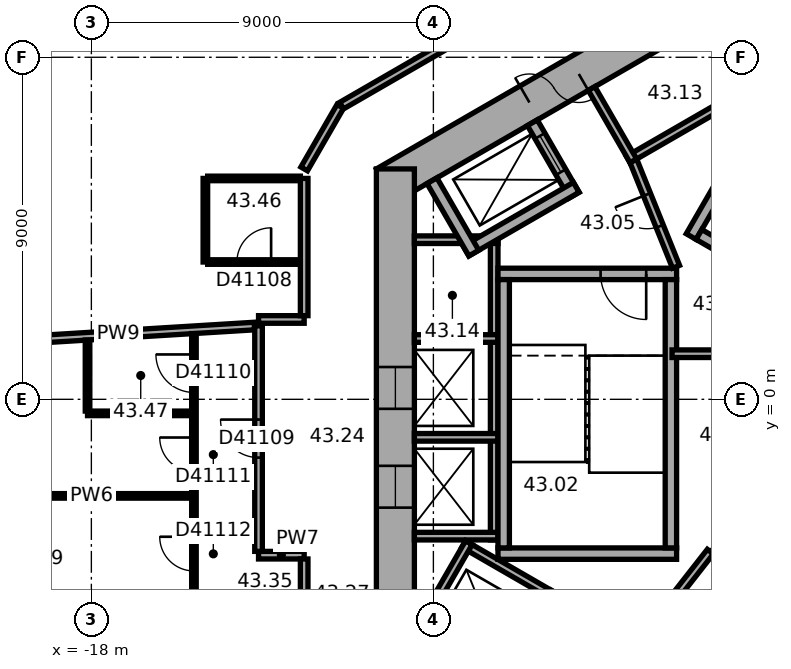
"""IFC4 building model, lengths in metres.
Left out: names, types, materials, properties, quantities, classifications, styles, units other than length and angle.
Written with IfcOpenShell. Run it as: python <this file> out.ifc"""

import sys

from ifc_helpers import new_model, si_unit, direction, frame, frame_2d, origin, place, context, subcontext, project, spatial, rectangle, extrude, element, fill, save


model = new_model("IFC4")
c1 = context("Model", 3, precision=1e-05, world=origin(), true_north=direction((0.0, 1.0)))
c2 = subcontext(c1, "Body", "Model", "MODEL_VIEW")
j1 = project(units=[si_unit("LENGTHUNIT", "METRE"), si_unit("PLANEANGLEUNIT", "RADIAN")], contexts=[c1])
p1 = place(None, origin())
s1 = spatial("IfcSite", under=j1, at=p1, CompositionType="ELEMENT")
p2 = place(p1, origin())
s2 = spatial("IfcBuilding", under=s1, at=p2, CompositionType="ELEMENT")
p3 = place(p2, frame((0.0, 0.0, 176.2)))
s3 = spatial("IfcBuildingStorey", under=s2, at=p3, CompositionType="ELEMENT", Elevation=176.2)
p4 = place(p3, frame((0.25, 11.691, 0.0), z_axis=(0.0, 0.0, 1.0), x_axis=(-0.866022616891, -0.50000482701, 0.0)))
e1 = element("IfcWall", 1, at=p4, inside=s3, PredefinedType="SHEAR", context=c2, shape_type="SweptSolid", body=[
    extrude(rectangle(XDim=12.125, YDim=1.0, at=frame_2d((6.062, 0.0))), origin(), (0.0, 0.0, 1.0), 3.7),
])
p5 = place(p4, frame((6.262, 0.0, 0.0)))
e2 = element("IfcOpeningElement", 2, at=p5, cuts=e1, PredefinedType="OPENING", context=c2, shape_type="SweptSolid", body=[
    extrude(rectangle(XDim=1.5, YDim=2.1, at=frame_2d((0.75, 1.05))), frame((0.0, 0.51, 0.0), z_axis=(0.0, -1.0, 0.0), x_axis=(1.0, 0.0, 0.0)), (0.0, 0.0, 1.0), 1.02),
])
p6 = place(p4, frame((3.112, 0.0, 0.0)))
e3 = element("IfcOpeningElement", 3, at=p6, cuts=e1, PredefinedType="OPENING", context=c2, shape_type="SweptSolid", body=[
    extrude(rectangle(XDim=0.9, YDim=2.1, at=frame_2d((0.45, 1.05))), frame((0.0, 0.51, 0.0), z_axis=(0.0, -1.0, 0.0), x_axis=(1.0, 0.0, 0.0)), (0.0, 0.0, 1.0), 1.02),
])
p7 = place(p3, frame((-10.0, 6.062, 0.0), z_axis=(0.0, 0.0, 1.0), x_axis=(0.0, -1.0, 0.0)))
e4 = element("IfcWall", 4, at=p7, inside=s3, PredefinedType="SHEAR", context=c2, shape_type="SweptSolid", body=[
    extrude(rectangle(XDim=12.125, YDim=1.0, at=frame_2d((6.062, 0.0))), origin(), (0.0, 0.0, 1.0), 3.7),
])
p8 = place(p7, frame((5.212, 0.0, 0.0)))
e5 = element("IfcOpeningElement", 5, at=p8, cuts=e4, PredefinedType="OPENING", context=c2, shape_type="SweptSolid", body=[
    extrude(rectangle(XDim=1.1, YDim=2.1, at=frame_2d((0.55, 1.05))), frame((0.0, 0.51, 0.0), z_axis=(0.0, -1.0, 0.0), x_axis=(1.0, 0.0, 0.0)), (0.0, 0.0, 1.0), 1.02),
])
p9 = place(p7, frame((7.812, 0.0, 0.0)))
e6 = element("IfcOpeningElement", 6, at=p9, cuts=e4, PredefinedType="OPENING", context=c2, shape_type="SweptSolid", body=[
    extrude(rectangle(XDim=1.1, YDim=2.1, at=frame_2d((0.55, 1.05))), frame((0.0, 0.51, 0.0), z_axis=(0.0, -1.0, 0.0), x_axis=(1.0, 0.0, 0.0)), (0.0, 0.0, 1.0), 1.02),
])
p10 = place(p3, frame((0.803, 9.009, 0.0), z_axis=(0.0, 0.0, 1.0), x_axis=(-0.866028230842, -0.499995103361, 0.0)))
e7 = element("IfcWall", 7, at=p10, inside=s3, PredefinedType="PARTITIONING", context=c2, shape_type="SweptSolid", body=[
    extrude(rectangle(XDim=5.4, YDim=0.2, at=frame_2d((2.7, 0.0))), origin(), (0.0, 0.0, 1.0), 3.42),
])
p11 = place(p3, frame((-3.737, 6.272, 0.0), z_axis=(0.0, 0.0, 1.0), x_axis=(-0.50002983664, 0.866008176907, 0.0)))
e8 = element("IfcWall", 8, at=p11, inside=s3, PredefinedType="PARTITIONING", context=c2, shape_type="SweptSolid", body=[
    extrude(rectangle(XDim=2.2, YDim=0.2, at=frame_2d((1.1, 0.0))), origin(), (0.0, 0.0, 1.0), 3.42),
])
p12 = place(p3, frame((-7.4, 4.3, 0.0), z_axis=(0.0, 0.0, 1.0), x_axis=(0.0, -1.0, 0.0)))
e9 = element("IfcWall", 9, at=p12, inside=s3, PredefinedType="PARTITIONING", context=c2, shape_type="SweptSolid", body=[
    extrude(rectangle(XDim=8.0, YDim=0.2, at=frame_2d((4.0, 0.0))), origin(), (0.0, 0.0, 1.0), 3.42),
])
for number, where, z_axis, x_axis in (
    (10, (-7.3, 4.2, 0.0), (0.0, 0.0, 1.0), (-1.0, 0.0, 0.0)),
    (11, (-7.3, 1.6, 0.0), (0.0, 0.0, 1.0), (-1.0, 0.0, 0.0)),
    (12, (-7.3, -1.0, 0.0), (0.0, 0.0, 1.0), (-1.0, 0.0, 0.0)),
    (13, (-7.3, -3.6, 0.0), (0.0, 0.0, 1.0), (-1.0, 0.0, 0.0)),
):
    element("IfcWall", number, at=place(p3, frame(where, z_axis=z_axis, x_axis=x_axis)), inside=s3, PredefinedType="PARTITIONING", context=c2, shape_type="SweptSolid", body=[
        extrude(rectangle(XDim=2.2, YDim=0.2, at=frame_2d((1.1, 0.0))), origin(), (0.0, 0.0, 1.0), 3.42),
    ])
p13 = place(p3, frame((-8.203, -3.809, 0.0), z_axis=(0.0, 0.0, 1.0), x_axis=(0.866028230842, -0.499995103361, 0.0)))
e14 = element("IfcWall", 14, at=p13, inside=s3, PredefinedType="PARTITIONING", context=c2, shape_type="SweptSolid", body=[
    extrude(rectangle(XDim=5.4, YDim=0.2, at=frame_2d((2.7, 0.0))), origin(), (0.0, 0.0, 1.0), 3.42),
])
p14 = place(p3, frame((-8.067, -3.772, 0.0), z_axis=(0.0, 0.0, 1.0), x_axis=(-0.50002983664, -0.866008176907, 0.0)))
e15 = element("IfcWall", 15, at=p14, inside=s3, PredefinedType="PARTITIONING", context=c2, shape_type="SweptSolid", body=[
    extrude(rectangle(XDim=2.2, YDim=0.2, at=frame_2d((1.1, 0.0))), origin(), (0.0, 0.0, 1.0), 3.42),
])
p15 = place(p3, frame((-2.216, 4.282, 0.0), z_axis=(0.0, 0.0, 1.0), x_axis=(0.499977259774, 0.866038532462, 0.0)))
e16 = element("IfcWall", 16, at=p15, inside=s3, PredefinedType="SHEAR", context=c2, shape_type="SweptSolid", body=[
    extrude(rectangle(XDim=4.7, YDim=0.3, at=frame_2d((2.35, 0.0))), origin(), (0.0, 0.0, 1.0), 3.42),
])
p16 = place(p3, frame((4.103, 0.807, 0.0), z_axis=(0.0, 0.0, 1.0), x_axis=(-0.866027801685, 0.499995846692, 0.0)))
e17 = element("IfcWall", 17, at=p16, inside=s3, PredefinedType="SHEAR", context=c2, shape_type="SweptSolid", body=[
    extrude(rectangle(XDim=7.06, YDim=0.3, at=frame_2d((3.53, 0.0))), origin(), (0.0, 0.0, 1.0), 3.42),
])
p17 = place(p3, frame((-2.6, 3.3, 0.0), z_axis=(0.0, 0.0, 1.0), x_axis=(-1.0, 0.0, 0.0)))
e18 = element("IfcWall", 18, at=p17, inside=s3, PredefinedType="SHEAR", context=c2, shape_type="SweptSolid", body=[
    extrude(rectangle(XDim=4.7, YDim=0.3, at=frame_2d((2.35, 0.0))), origin(), (0.0, 0.0, 1.0), 3.42),
])
p18 = place(p17, frame((0.8, 0.0, 0.0)))
e19 = element("IfcOpeningElement", 19, at=p18, cuts=e18, PredefinedType="OPENING", context=c2, shape_type="SweptSolid", body=[
    extrude(rectangle(XDim=1.2, YDim=2.1, at=frame_2d((0.6, 1.05))), frame((0.0, 0.16, 0.0), z_axis=(0.0, -1.0, 0.0), x_axis=(1.0, 0.0, 0.0)), (0.0, 0.0, 1.0), 0.32),
])
p19 = place(p3, frame((-2.6, -4.06, 0.0), z_axis=(0.0, 0.0, 1.0), x_axis=(-1.0, 0.0, 0.0)))
e20 = element("IfcWall", 20, at=p19, inside=s3, PredefinedType="SHEAR", context=c2, shape_type="SweptSolid", body=[
    extrude(rectangle(XDim=4.7, YDim=0.3, at=frame_2d((2.35, 0.0))), origin(), (0.0, 0.0, 1.0), 3.42),
])
for number, where, z_axis, x_axis in (
    (21, (-2.75, 3.15, 0.0), (0.0, 0.0, 1.0), (0.0, -1.0, 0.0)),
    (22, (-7.15, 3.15, 0.0), (0.0, 0.0, 1.0), (0.0, -1.0, 0.0)),
):
    element("IfcWall", number, at=place(p3, frame(where, z_axis=z_axis, x_axis=x_axis)), inside=s3, PredefinedType="SHEAR", context=c2, shape_type="SweptSolid", body=[
        extrude(rectangle(XDim=7.06, YDim=0.3, at=frame_2d((3.53, 0.0))), origin(), (0.0, 0.0, 1.0), 3.42),
    ])
p20 = place(p3, frame((-5.295, 5.372, 0.0), z_axis=(0.0, 0.0, 1.0), x_axis=(-0.500077893725, 0.86598042715, 0.0)))
e23 = element("IfcWall", 23, at=p20, inside=s3, PredefinedType="SHEAR", context=c2, shape_type="SweptSolid", body=[
    extrude(rectangle(XDim=2.2, YDim=0.3, at=frame_2d((1.1, 0.0))), origin(), (0.0, 0.0, 1.0), 3.42),
])
p21 = place(p20, frame((0.7, 0.0, 0.0)))
e24 = element("IfcOpeningElement", 24, at=p21, cuts=e23, PredefinedType="OPENING", context=c2, shape_type="SweptSolid", body=[
    extrude(rectangle(XDim=1.1, YDim=2.1, at=frame_2d((0.55, 1.05))), frame((0.0, 0.16, 0.0), z_axis=(0.0, -1.0, 0.0), x_axis=(1.0, 0.0, 0.0)), (0.0, 0.0, 1.0), 0.32),
])
p22 = place(p3, frame((-5.24, 5.577, 0.0), z_axis=(0.0, 0.0, 1.0), x_axis=(-0.866014461049, -0.500018952895, 0.0)))
e25 = element("IfcWall", 25, at=p22, inside=s3, PredefinedType="SHEAR", context=c2, shape_type="SweptSolid", body=[
    extrude(rectangle(XDim=3.35, YDim=0.3, at=frame_2d((1.675, 0.0))), origin(), (0.0, 0.0, 1.0), 3.42),
])
p23 = place(p3, frame((-7.937, 3.847, 0.0), z_axis=(0.0, 0.0, 1.0), x_axis=(-0.50002983664, 0.866008176907, 0.0)))
e26 = element("IfcWall", 26, at=p23, inside=s3, PredefinedType="SHEAR", context=c2, shape_type="SweptSolid", body=[
    extrude(rectangle(XDim=2.2, YDim=0.3, at=frame_2d((1.1, 0.0))), origin(), (0.0, 0.0, 1.0), 3.42),
])
p24 = place(p3, frame((-2.615, 3.487, 0.0), z_axis=(0.0, 0.0, 1.0), x_axis=(-0.373576831041, 0.92759924068, 0.0)))
e27 = element("IfcWall", 27, at=p24, inside=s3, PredefinedType="PARTITIONING", context=c2, shape_type="SweptSolid", body=[
    extrude(rectangle(XDim=3.002, YDim=0.2, at=frame_2d((1.501, 0.0))), origin(), (0.0, 0.0, 1.0), 3.42),
])
p25 = place(p24, frame((1.15, 0.0, 0.0)))
e28 = element("IfcOpeningElement", 28, at=p25, cuts=e27, PredefinedType="OPENING", context=c2, shape_type="SweptSolid", body=[
    extrude(rectangle(XDim=0.9, YDim=2.1, at=frame_2d((0.45, 1.05))), frame((0.0, 0.11, 0.0), z_axis=(0.0, -1.0, 0.0), x_axis=(1.0, 0.0, 0.0)), (0.0, 0.0, 1.0), 0.22),
])
p26 = place(p3, frame((-1.712, -4.008, 0.0), z_axis=(0.0, 0.0, 1.0), x_axis=(-0.616549420702, -0.787316208287, 0.0)))
e29 = element("IfcWall", 29, at=p26, inside=s3, PredefinedType="PARTITIONING", context=c2, shape_type="SweptSolid", body=[
    extrude(rectangle(XDim=3.002, YDim=0.2, at=frame_2d((1.501, 0.0))), origin(), (0.0, 0.0, 1.0), 3.42),
])
p27 = place(p3, frame((-2.72, 1.2, 0.0), z_axis=(0.0, 0.0, 1.0), x_axis=(1.0, 0.0, 0.0)))
e30 = element("IfcWall", 30, at=p27, inside=s3, PredefinedType="PARTITIONING", context=c2, shape_type="SweptSolid", body=[
    extrude(rectangle(XDim=5.961, YDim=0.2, at=frame_2d((2.981, 0.0))), origin(), (0.0, 0.0, 1.0), 3.42),
])
p28 = place(p3, frame((-20.88, 1.49, 0.0), z_axis=(0.0, 0.0, 1.0), x_axis=(0.998134881975, 0.061047173439, 0.0)))
e31 = element("IfcWall", 31, at=p28, inside=s3, PredefinedType="PARTITIONING", context=c2, shape_type="SweptSolid", body=[
    extrude(rectangle(XDim=7.183, YDim=0.2, at=frame_2d((3.591, 0.0))), origin(), (0.0, 0.0, 1.0), 2.87),
])
p29 = place(p3, frame((-20.633, -2.541, 0.0), z_axis=(0.0, 0.0, 1.0), x_axis=(1.0, 0.0, 0.0)))
e32 = element("IfcWall", 32, at=p29, inside=s3, PredefinedType="PARTITIONING", context=c2, shape_type="SweptSolid", body=[
    extrude(rectangle(XDim=5.272, YDim=0.12, at=frame_2d((2.636, 0.0))), origin(), (0.0, 0.0, 1.0), 3.42),
])
p30 = place(p3, frame((-18.101, -0.369, 0.0), z_axis=(0.0, 0.0, 1.0), x_axis=(1.0, 0.0, 0.0)))
e33 = element("IfcWall", 33, at=p30, inside=s3, PredefinedType="PARTITIONING", context=c2, shape_type="SweptSolid", body=[
    extrude(rectangle(XDim=2.74, YDim=0.12, at=frame_2d((1.37, 0.0))), origin(), (0.0, 0.0, 1.0), 3.42),
])
p31 = place(p3, frame((-18.101, 1.559, 0.0), z_axis=(0.0, 0.0, 1.0), x_axis=(0.0, -1.0, 0.0)))
e34 = element("IfcWall", 34, at=p31, inside=s3, PredefinedType="PARTITIONING", context=c2, shape_type="SweptSolid", body=[
    extrude(rectangle(XDim=1.869, YDim=0.12, at=frame_2d((0.934, 0.0))), origin(), (0.0, 0.0, 1.0), 3.42),
])
p32 = place(p3, frame((-15.301, 1.731, 0.0), z_axis=(0.0, 0.0, 1.0), x_axis=(0.0, -1.0, 0.0)))
e35 = element("IfcWall", 35, at=p32, inside=s3, PredefinedType="PARTITIONING", context=c2, shape_type="SweptSolid", body=[
    extrude(rectangle(XDim=7.322, YDim=0.12, at=frame_2d((3.661, 0.0))), origin(), (0.0, 0.0, 1.0), 3.42),
])
p33 = place(p32, frame((0.55, 0.0, 0.0)))
e36 = element("IfcOpeningElement", 36, at=p33, cuts=e35, PredefinedType="OPENING", context=c2, shape_type="SweptSolid", body=[
    extrude(rectangle(XDim=1.0, YDim=2.1, at=frame_2d((0.5, 1.05))), frame((0.0, 0.07, 0.0), z_axis=(0.0, -1.0, 0.0), x_axis=(1.0, 0.0, 0.0)), (0.0, 0.0, 1.0), 0.14),
])
p34 = place(p32, frame((2.736, 0.0, 0.0)))
e37 = element("IfcOpeningElement", 37, at=p34, cuts=e35, PredefinedType="OPENING", context=c2, shape_type="SweptSolid", body=[
    extrude(rectangle(XDim=0.9, YDim=2.1, at=frame_2d((0.45, 1.05))), frame((0.0, 0.07, 0.0), z_axis=(0.0, -1.0, 0.0), x_axis=(1.0, 0.0, 0.0)), (0.0, 0.0, 1.0), 0.14),
])
p35 = place(p32, frame((5.347, 0.0, 0.0)))
e38 = element("IfcOpeningElement", 38, at=p35, cuts=e35, PredefinedType="OPENING", context=c2, shape_type="SweptSolid", body=[
    extrude(rectangle(XDim=0.9, YDim=2.1, at=frame_2d((0.45, 1.05))), frame((0.0, 0.07, 0.0), z_axis=(0.0, -1.0, 0.0), x_axis=(1.0, 0.0, 0.0)), (0.0, 0.0, 1.0), 0.14),
])
p36 = place(p3, frame((-15.0, 3.612, 0.0), z_axis=(0.0, 0.0, 1.0), x_axis=(0.0, 1.0, 0.0)))
e39 = element("IfcWall", 39, at=p36, inside=s3, PredefinedType="PARTITIONING", context=c2, shape_type="SweptSolid", body=[
    extrude(rectangle(XDim=2.2, YDim=0.12, at=frame_2d((1.1, 0.0))), origin(), (0.0, 0.0, 1.0), 3.42),
])
p37 = place(p3, frame((-14.94, 5.812, 0.0), z_axis=(0.0, 0.0, 1.0), x_axis=(1.0, 0.0, 0.0)))
e40 = element("IfcWall", 40, at=p37, inside=s3, PredefinedType="PARTITIONING", context=c2, shape_type="SweptSolid", body=[
    extrude(rectangle(XDim=2.44, YDim=0.12, at=frame_2d((1.22, 0.0))), origin(), (0.0, 0.0, 1.0), 3.42),
])
p38 = place(p3, frame((-13.601, -4.101, 0.0), z_axis=(0.0, 0.0, 1.0), x_axis=(1.0, 0.0, 0.0)))
e41 = element("IfcWall", 41, at=p38, inside=s3, PredefinedType="PARTITIONING", context=c2, shape_type="SweptSolid", body=[
    extrude(rectangle(XDim=1.201, YDim=0.2, at=frame_2d((0.601, 0.0))), origin(), (0.0, 0.0, 1.0), 3.42),
])
p39 = place(p3, frame((-13.601, 1.935, 0.0), z_axis=(0.0, 0.0, 1.0), x_axis=(0.0, -1.0, 0.0)))
e42 = element("IfcWall", 42, at=p39, inside=s3, PredefinedType="PARTITIONING", context=c2, shape_type="SweptSolid", body=[
    extrude(rectangle(XDim=5.936, YDim=0.2, at=frame_2d((2.968, 0.0))), origin(), (0.0, 0.0, 1.0), 3.42),
])
p40 = place(p39, frame((2.468, 0.0, 0.0)))
e43 = element("IfcOpeningElement", 43, at=p40, cuts=e42, PredefinedType="OPENING", context=c2, shape_type="SweptSolid", body=[
    extrude(rectangle(XDim=1.0, YDim=2.1, at=frame_2d((0.5, 1.05))), frame((0.0, 0.11, 0.0), z_axis=(0.0, -1.0, 0.0), x_axis=(1.0, 0.0, 0.0)), (0.0, 0.0, 1.0), 0.22),
])
p41 = place(p3, frame((-12.5, 3.612, 0.0), z_axis=(0.0, 0.0, 1.0), x_axis=(-1.0, 0.0, 0.0)))
e44 = element("IfcWall", 44, at=p41, inside=s3, PredefinedType="PARTITIONING", context=c2, shape_type="SweptSolid", body=[
    extrude(rectangle(XDim=2.44, YDim=0.12, at=frame_2d((1.22, 0.0))), origin(), (0.0, 0.0, 1.0), 3.42),
])
p42 = place(p41, frame((0.77, 0.0, 0.0)))
e45 = element("IfcOpeningElement", 45, at=p42, cuts=e44, PredefinedType="OPENING", context=c2, shape_type="SweptSolid", body=[
    extrude(rectangle(XDim=0.9, YDim=2.1, at=frame_2d((0.45, 1.05))), frame((0.0, 0.07, 0.0), z_axis=(0.0, -1.0, 0.0), x_axis=(1.0, 0.0, 0.0)), (0.0, 0.0, 1.0), 0.14),
])
p43 = place(p3, frame((-12.4, -4.201, 0.0), z_axis=(0.0, 0.0, 1.0), x_axis=(0.0, -1.0, 0.0)))
e46 = element("IfcWall", 46, at=p43, inside=s3, PredefinedType="PARTITIONING", context=c2, shape_type="SweptSolid", body=[
    extrude(rectangle(XDim=1.821, YDim=0.2, at=frame_2d((0.911, 0.0))), origin(), (0.0, 0.0, 1.0), 3.42),
])
p44 = place(p3, frame((-12.4, 2.101, 0.0), z_axis=(0.0, 0.0, 1.0), x_axis=(-1.0, 0.0, 0.0)))
e47 = element("IfcWall", 47, at=p44, inside=s3, PredefinedType="PARTITIONING", context=c2, shape_type="SweptSolid", body=[
    extrude(rectangle(XDim=1.201, YDim=0.2, at=frame_2d((0.601, 0.0))), origin(), (0.0, 0.0, 1.0), 3.42),
])
p45 = place(p3, frame((-12.4, 5.812, 0.0), z_axis=(0.0, 0.0, 1.0), x_axis=(0.0, -1.0, 0.0)))
e48 = element("IfcWall", 48, at=p45, inside=s3, PredefinedType="PARTITIONING", context=c2, shape_type="SweptSolid", body=[
    extrude(rectangle(XDim=3.611, YDim=0.2, at=frame_2d((1.806, 0.0))), origin(), (0.0, 0.0, 1.0), 3.42),
])
p46 = place(p3, frame((-11.45, 7.708, 0.0), z_axis=(0.0, 0.0, 1.0), x_axis=(-0.500022797313, -0.86601224135, 0.0)))
e49 = element("IfcWall", 49, at=p46, inside=s3, PredefinedType="PARTITIONING", context=c2, shape_type="SweptSolid", body=[
    extrude(rectangle(XDim=1.9, YDim=0.2, at=frame_2d((0.95, 0.0))), origin(), (0.0, 0.0, 1.0), 3.42),
])
p47 = place(p3, frame((-8.678, 9.308, 0.0), z_axis=(0.0, 0.0, 1.0), x_axis=(-0.866000359435, -0.500043375578, 0.0)))
e50 = element("IfcWall", 50, at=p47, inside=s3, PredefinedType="PARTITIONING", context=c2, shape_type="SweptSolid", body=[
    extrude(rectangle(XDim=3.161, YDim=0.2, at=frame_2d((1.581, 0.0))), origin(), (0.0, 0.0, 1.0), 3.42),
])
p48 = place(p5, origin())
e51 = element("IfcDoor", 51, at=p48, inside=s3, OperationType="DOUBLE_DOOR_SINGLE_SWING", PredefinedType="DOOR", context=c2, shape_type="SweptSolid", body=[
    extrude(rectangle(XDim=1.5, YDim=2.1, at=frame_2d((0.75, 1.05))), frame((0.0, 0.025, 0.0), z_axis=(0.0, -1.0, 0.0), x_axis=(1.0, 0.0, 0.0)), (0.0, 0.0, 1.0), 0.05),
])
fill(e2, e51)
p49 = place(p18, origin())
e52 = element("IfcDoor", 52, at=p49, inside=s3, OperationType="SINGLE_SWING_RIGHT", PredefinedType="DOOR", context=c2, shape_type="SweptSolid", body=[
    extrude(rectangle(XDim=1.2, YDim=2.1, at=frame_2d((0.6, 1.05))), frame((0.0, 0.025, 0.0), z_axis=(0.0, -1.0, 0.0), x_axis=(1.0, 0.0, 0.0)), (0.0, 0.0, 1.0), 0.05),
])
fill(e19, e52)
p50 = place(p25, origin())
e53 = element("IfcDoor", 53, at=p50, inside=s3, OperationType="SINGLE_SWING_LEFT", PredefinedType="DOOR", context=c2, shape_type="SweptSolid", body=[
    extrude(rectangle(XDim=0.9, YDim=2.1, at=frame_2d((0.45, 1.05))), frame((0.0, 0.025, 0.0), z_axis=(0.0, -1.0, 0.0), x_axis=(1.0, 0.0, 0.0)), (0.0, 0.0, 1.0), 0.05),
])
fill(e28, e53)
p51 = place(p21, origin())
e54 = element("IfcDoor", 54, at=p51, inside=s3, OperationType="DOUBLE_DOOR_SLIDING", PredefinedType="DOOR", context=c2, shape_type="SweptSolid", body=[
    extrude(rectangle(XDim=1.1, YDim=2.1, at=frame_2d((0.55, 1.05))), frame((0.0, 0.025, 0.0), z_axis=(0.0, -1.0, 0.0), x_axis=(1.0, 0.0, 0.0)), (0.0, 0.0, 1.0), 0.05),
])
fill(e24, e54)
p52 = place(p8, origin())
e55 = element("IfcDoor", 55, at=p52, inside=s3, OperationType="DOUBLE_DOOR_SLIDING", PredefinedType="DOOR", context=c2, shape_type="SweptSolid", body=[
    extrude(rectangle(XDim=1.1, YDim=2.1, at=frame_2d((0.55, 1.05))), frame((0.0, 0.025, 0.0), z_axis=(0.0, -1.0, 0.0), x_axis=(1.0, 0.0, 0.0)), (0.0, 0.0, 1.0), 0.05),
])
fill(e5, e55)
p53 = place(p9, origin())
e56 = element("IfcDoor", 56, at=p53, inside=s3, OperationType="DOUBLE_DOOR_SLIDING", PredefinedType="DOOR", context=c2, shape_type="SweptSolid", body=[
    extrude(rectangle(XDim=1.1, YDim=2.1, at=frame_2d((0.55, 1.05))), frame((0.0, 0.025, 0.0), z_axis=(0.0, -1.0, 0.0), x_axis=(1.0, 0.0, 0.0)), (0.0, 0.0, 1.0), 0.05),
])
fill(e6, e56)
p54 = place(p42, origin())
e57 = element("IfcDoor", 57, at=p54, inside=s3, OperationType="SINGLE_SWING_LEFT", PredefinedType="DOOR", context=c2, shape_type="SweptSolid", body=[
    extrude(rectangle(XDim=0.9, YDim=2.1, at=frame_2d((0.45, 1.05))), frame((0.0, 0.025, 0.0), z_axis=(0.0, -1.0, 0.0), x_axis=(1.0, 0.0, 0.0)), (0.0, 0.0, 1.0), 0.05),
])
fill(e45, e57)
p55 = place(p40, origin())
e58 = element("IfcDoor", 58, at=p55, inside=s3, OperationType="SINGLE_SWING_LEFT", PredefinedType="DOOR", context=c2, shape_type="SweptSolid", body=[
    extrude(rectangle(XDim=1.0, YDim=2.1, at=frame_2d((0.5, 1.05))), frame((0.0, 0.025, 0.0), z_axis=(0.0, -1.0, 0.0), x_axis=(1.0, 0.0, 0.0)), (0.0, 0.0, 1.0), 0.05),
])
fill(e43, e58)
p56 = place(p33, origin())
e59 = element("IfcDoor", 59, at=p56, inside=s3, OperationType="SINGLE_SWING_LEFT", PredefinedType="DOOR", context=c2, shape_type="SweptSolid", body=[
    extrude(rectangle(XDim=1.0, YDim=2.1, at=frame_2d((0.5, 1.05))), frame((0.0, 0.025, 0.0), z_axis=(0.0, -1.0, 0.0), x_axis=(1.0, 0.0, 0.0)), (0.0, 0.0, 1.0), 0.05),
])
fill(e36, e59)
p57 = place(p34, origin())
e60 = element("IfcDoor", 60, at=p57, inside=s3, OperationType="SINGLE_SWING_LEFT", PredefinedType="DOOR", context=c2, shape_type="SweptSolid", body=[
    extrude(rectangle(XDim=0.9, YDim=2.1, at=frame_2d((0.45, 1.05))), frame((0.0, 0.025, 0.0), z_axis=(0.0, -1.0, 0.0), x_axis=(1.0, 0.0, 0.0)), (0.0, 0.0, 1.0), 0.05),
])
fill(e37, e60)
p58 = place(p35, origin())
e61 = element("IfcDoor", 61, at=p58, inside=s3, OperationType="SINGLE_SWING_LEFT", PredefinedType="DOOR", context=c2, shape_type="SweptSolid", body=[
    extrude(rectangle(XDim=0.9, YDim=2.1, at=frame_2d((0.45, 1.05))), frame((0.0, 0.025, 0.0), z_axis=(0.0, -1.0, 0.0), x_axis=(1.0, 0.0, 0.0)), (0.0, 0.0, 1.0), 0.05),
])
fill(e38, e61)
save(model, sys.argv[1])
